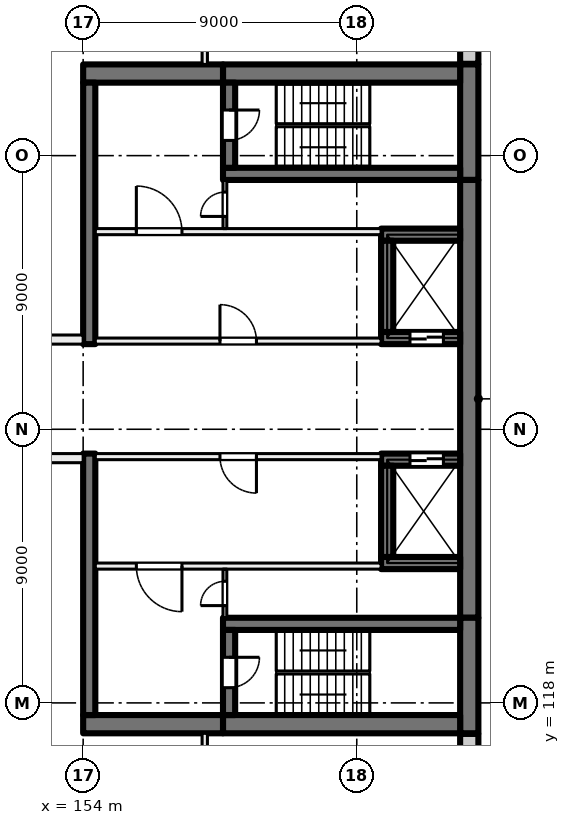
"""IFC4 building model, lengths in metres.
Left out: names, types, materials, properties, quantities, classifications, styles, units other than length and angle.
Written with IfcOpenShell. Run it as: python <this file> out.ifc"""

import sys

from ifc_helpers import new_model, si_unit, direction, frame, frame_2d, origin, place, context, subcontext, project, spatial, rectangle, extrude, element, fill, save


model = new_model("IFC4")
c1 = context("Model", 3, precision=1e-05, world=origin(), true_north=direction((0.0, 1.0)))
c2 = subcontext(c1, "Body", "Model", "MODEL_VIEW")
j1 = project(units=[si_unit("LENGTHUNIT", "METRE"), si_unit("PLANEANGLEUNIT", "RADIAN")], contexts=[c1])
p1 = place(None, origin())
s1 = spatial("IfcSite", under=j1, at=p1, CompositionType="ELEMENT")
p2 = place(p1, origin())
s2 = spatial("IfcBuilding", under=s1, at=p2, CompositionType="ELEMENT")
p3 = place(p2, frame((0.0, 0.0, 47.5)))
s3 = spatial("IfcBuildingStorey", under=s2, at=p3, CompositionType="ELEMENT", Elevation=47.5)
p4 = place(p3, frame((166.7, 139.0, 0.0), z_axis=(0.0, 0.0, 1.0), x_axis=(0.0, -1.0, 0.0)))
e1 = element("IfcWall", 1, at=p4, inside=s3, PredefinedType="SHEAR", context=c2, shape_type="SweptSolid", body=[
    extrude(rectangle(XDim=3.8, YDim=0.6, at=frame_2d((1.9, 0.0))), origin(), (0.0, 0.0, 1.0), 4.0),
])
p5 = place(p3, frame((166.7, 135.2, 0.0), z_axis=(0.0, 0.0, 1.0), x_axis=(0.0, -1.0, 0.0)))
e2 = element("IfcWall", 2, at=p5, inside=s3, PredefinedType="SHEAR", context=c2, shape_type="SweptSolid", body=[
    extrude(rectangle(XDim=14.4, YDim=0.6, at=frame_2d((7.2, 0.0))), origin(), (0.0, 0.0, 1.0), 4.0),
])
p6 = place(p3, frame((166.7, 120.8, 0.0), z_axis=(0.0, 0.0, 1.0), x_axis=(0.0, -1.0, 0.0)))
e3 = element("IfcWall", 3, at=p6, inside=s3, PredefinedType="SHEAR", context=c2, shape_type="SweptSolid", body=[
    extrude(rectangle(XDim=3.8, YDim=0.6, at=frame_2d((1.9, 0.0))), origin(), (0.0, 0.0, 1.0), 4.0),
])
for number, where, z_axis, x_axis in (
    (4, (166.4, 138.7, 0.0), (0.0, 0.0, 1.0), (-1.0, 0.0, 0.0)),
    (5, (166.4, 117.3, 0.0), (0.0, 0.0, 1.0), (-1.0, 0.0, 0.0)),
):
    element("IfcWall", number, at=place(p3, frame(where, z_axis=z_axis, x_axis=x_axis)), inside=s3, PredefinedType="SHEAR", context=c2, shape_type="SweptSolid", body=[
        extrude(rectangle(XDim=7.8, YDim=0.6, at=frame_2d((3.9, 0.0))), origin(), (0.0, 0.0, 1.0), 4.0),
    ])
for number, where, z_axis, x_axis in (
    (6, (158.6, 138.7, 0.0), (0.0, 0.0, 1.0), (-1.0, 0.0, 0.0)),
    (7, (158.6, 117.3, 0.0), (0.0, 0.0, 1.0), (-1.0, 0.0, 0.0)),
):
    element("IfcWall", number, at=place(p3, frame(where, z_axis=z_axis, x_axis=x_axis)), inside=s3, PredefinedType="SHEAR", context=c2, shape_type="SweptSolid", body=[
        extrude(rectangle(XDim=4.6, YDim=0.6, at=frame_2d((2.3, 0.0))), origin(), (0.0, 0.0, 1.0), 4.0),
    ])
p7 = place(p3, frame((166.4, 135.4, 0.0), z_axis=(0.0, 0.0, 1.0), x_axis=(-1.0, 0.0, 0.0)))
e8 = element("IfcWall", 8, at=p7, inside=s3, PredefinedType="SHEAR", context=c2, shape_type="SweptSolid", body=[
    extrude(rectangle(XDim=7.8, YDim=0.4, at=frame_2d((3.9, 0.0))), origin(), (0.0, 0.0, 1.0), 4.0),
])
p8 = place(p3, frame((158.8, 138.4, 0.0), z_axis=(0.0, 0.0, 1.0), x_axis=(0.0, -1.0, 0.0)))
e9 = element("IfcWall", 9, at=p8, inside=s3, PredefinedType="SHEAR", context=c2, shape_type="SweptSolid", body=[
    extrude(rectangle(XDim=2.8, YDim=0.4, at=frame_2d((1.4, 0.0))), origin(), (0.0, 0.0, 1.0), 4.0),
])
p9 = place(p8, frame((0.9, 0.0, 0.0)))
e10 = element("IfcOpeningElement", 10, at=p9, cuts=e9, PredefinedType="OPENING", context=c2, shape_type="SweptSolid", body=[
    extrude(rectangle(XDim=1.0, YDim=2.1, at=frame_2d((0.5, 1.05))), frame((0.0, 0.21, 0.0), z_axis=(0.0, -1.0, 0.0), x_axis=(1.0, 0.0, 0.0)), (0.0, 0.0, 1.0), 0.42),
])
p10 = place(p3, frame((166.4, 120.6, 0.0), z_axis=(0.0, 0.0, 1.0), x_axis=(-1.0, 0.0, 0.0)))
e11 = element("IfcWall", 11, at=p10, inside=s3, PredefinedType="SHEAR", context=c2, shape_type="SweptSolid", body=[
    extrude(rectangle(XDim=7.8, YDim=0.4, at=frame_2d((3.9, 0.0))), origin(), (0.0, 0.0, 1.0), 4.0),
])
p11 = place(p3, frame((158.8, 120.4, 0.0), z_axis=(0.0, 0.0, 1.0), x_axis=(0.0, -1.0, 0.0)))
e12 = element("IfcWall", 12, at=p11, inside=s3, PredefinedType="SHEAR", context=c2, shape_type="SweptSolid", body=[
    extrude(rectangle(XDim=2.8, YDim=0.4, at=frame_2d((1.4, 0.0))), origin(), (0.0, 0.0, 1.0), 4.0),
])
p12 = place(p11, frame((0.9, 0.0, 0.0)))
e13 = element("IfcOpeningElement", 13, at=p12, cuts=e12, PredefinedType="OPENING", context=c2, shape_type="SweptSolid", body=[
    extrude(rectangle(XDim=1.0, YDim=2.1, at=frame_2d((0.5, 1.05))), frame((0.0, 0.21, 0.0), z_axis=(0.0, -1.0, 0.0), x_axis=(1.0, 0.0, 0.0)), (0.0, 0.0, 1.0), 0.42),
])
p13 = place(p3, frame((166.4, 130.0, 0.0), z_axis=(0.0, 0.0, 1.0), x_axis=(-1.0, 0.0, 0.0)))
e14 = element("IfcWall", 14, at=p13, inside=s3, PredefinedType="SHEAR", context=c2, shape_type="SweptSolid", body=[
    extrude(rectangle(XDim=2.6, YDim=0.4, at=frame_2d((1.3, 0.0))), origin(), (0.0, 0.0, 1.0), 4.0),
])
p14 = place(p13, frame((0.55, 0.0, 0.0)))
e15 = element("IfcOpeningElement", 15, at=p14, cuts=e14, PredefinedType="OPENING", context=c2, shape_type="SweptSolid", body=[
    extrude(rectangle(XDim=1.1, YDim=2.1, at=frame_2d((0.55, 1.05))), frame((0.0, 0.21, 0.0), z_axis=(0.0, -1.0, 0.0), x_axis=(1.0, 0.0, 0.0)), (0.0, 0.0, 1.0), 0.42),
])
p15 = place(p3, frame((166.4, 133.4, 0.0), z_axis=(0.0, 0.0, 1.0), x_axis=(-1.0, 0.0, 0.0)))
e16 = element("IfcWall", 16, at=p15, inside=s3, PredefinedType="SHEAR", context=c2, shape_type="SweptSolid", body=[
    extrude(rectangle(XDim=2.6, YDim=0.4, at=frame_2d((1.3, 0.0))), origin(), (0.0, 0.0, 1.0), 4.0),
])
p16 = place(p3, frame((164.0, 133.2, 0.0), z_axis=(0.0, 0.0, 1.0), x_axis=(0.0, -1.0, 0.0)))
e17 = element("IfcWall", 17, at=p16, inside=s3, PredefinedType="SHEAR", context=c2, shape_type="SweptSolid", body=[
    extrude(rectangle(XDim=3.0, YDim=0.4, at=frame_2d((1.5, 0.0))), origin(), (0.0, 0.0, 1.0), 4.0),
])
p17 = place(p3, frame((166.4, 126.0, 0.0), z_axis=(0.0, 0.0, 1.0), x_axis=(-1.0, 0.0, 0.0)))
e18 = element("IfcWall", 18, at=p17, inside=s3, PredefinedType="SHEAR", context=c2, shape_type="SweptSolid", body=[
    extrude(rectangle(XDim=2.6, YDim=0.4, at=frame_2d((1.3, 0.0))), origin(), (0.0, 0.0, 1.0), 4.0),
])
p18 = place(p17, frame((0.55, 0.0, 0.0)))
e19 = element("IfcOpeningElement", 19, at=p18, cuts=e18, PredefinedType="OPENING", context=c2, shape_type="SweptSolid", body=[
    extrude(rectangle(XDim=1.1, YDim=2.1, at=frame_2d((0.55, 1.05))), frame((0.0, 0.21, 0.0), z_axis=(0.0, -1.0, 0.0), x_axis=(1.0, 0.0, 0.0)), (0.0, 0.0, 1.0), 0.42),
])
p19 = place(p3, frame((166.4, 122.6, 0.0), z_axis=(0.0, 0.0, 1.0), x_axis=(-1.0, 0.0, 0.0)))
e20 = element("IfcWall", 20, at=p19, inside=s3, PredefinedType="SHEAR", context=c2, shape_type="SweptSolid", body=[
    extrude(rectangle(XDim=2.6, YDim=0.4, at=frame_2d((1.3, 0.0))), origin(), (0.0, 0.0, 1.0), 4.0),
])
p20 = place(p3, frame((164.0, 125.8, 0.0), z_axis=(0.0, 0.0, 1.0), x_axis=(0.0, -1.0, 0.0)))
e21 = element("IfcWall", 21, at=p20, inside=s3, PredefinedType="SHEAR", context=c2, shape_type="SweptSolid", body=[
    extrude(rectangle(XDim=3.0, YDim=0.4, at=frame_2d((1.5, 0.0))), origin(), (0.0, 0.0, 1.0), 4.0),
])
for number, where, z_axis, x_axis in (
    (22, (154.2, 138.4, 0.0), (0.0, 0.0, 1.0), (0.0, -1.0, 0.0)),
    (23, (154.2, 126.2, 0.0), (0.0, 0.0, 1.0), (0.0, -1.0, 0.0)),
):
    element("IfcWall", number, at=place(p3, frame(where, z_axis=z_axis, x_axis=x_axis)), inside=s3, PredefinedType="SHEAR", context=c2, shape_type="SweptSolid", body=[
        extrude(rectangle(XDim=8.6, YDim=0.4, at=frame_2d((4.3, 0.0))), origin(), (0.0, 0.0, 1.0), 4.0),
    ])
p21 = place(p3, frame((166.7, 116.98, 0.0), z_axis=(0.0, 0.0, 1.0), x_axis=(0.0, -1.0, 0.0)))
e24 = element("IfcWall", 24, at=p21, inside=s3, PredefinedType="SOLIDWALL", context=c2, shape_type="SweptSolid", body=[
    extrude(rectangle(XDim=2.98, YDim=0.6, at=frame_2d((1.49, 0.0))), origin(), (0.0, 0.0, 1.0), 3.625),
])
p22 = place(p3, frame((166.7, 141.93, 0.0), z_axis=(0.0, 0.0, 1.0), x_axis=(0.0, -1.0, 0.0)))
e25 = element("IfcWall", 25, at=p22, inside=s3, PredefinedType="SOLIDWALL", context=c2, shape_type="SweptSolid", body=[
    extrude(rectangle(XDim=2.91, YDim=0.6, at=frame_2d((1.455, 0.0))), origin(), (0.0, 0.0, 1.0), 3.625),
])
p23 = place(p3, frame((163.8, 126.1, 0.0), z_axis=(0.0, 0.0, 1.0), x_axis=(-1.0, 0.0, 0.0)))
e26 = element("IfcWall", 26, at=p23, inside=s3, PredefinedType="PARTITIONING", context=c2, shape_type="SweptSolid", body=[
    extrude(rectangle(XDim=9.4, YDim=0.2, at=frame_2d((4.7, 0.0))), origin(), (0.0, 0.0, 1.0), 3.625),
])
p24 = place(p23, frame((4.1, 0.0, 0.0)))
e27 = element("IfcOpeningElement", 27, at=p24, cuts=e26, PredefinedType="OPENING", context=c2, shape_type="SweptSolid", body=[
    extrude(rectangle(XDim=1.2, YDim=2.1, at=frame_2d((0.6, 1.05))), frame((0.0, 0.11, 0.0), z_axis=(0.0, -1.0, 0.0), x_axis=(1.0, 0.0, 0.0)), (0.0, 0.0, 1.0), 0.22),
])
p25 = place(p3, frame((163.8, 122.5, 0.0), z_axis=(0.0, 0.0, 1.0), x_axis=(-1.0, 0.0, 0.0)))
e28 = element("IfcWall", 28, at=p25, inside=s3, PredefinedType="PARTITIONING", context=c2, shape_type="SweptSolid", body=[
    extrude(rectangle(XDim=9.4, YDim=0.2, at=frame_2d((4.7, 0.0))), origin(), (0.0, 0.0, 1.0), 3.625),
])
p26 = place(p25, frame((6.55, 0.0, 0.0)))
e29 = element("IfcOpeningElement", 29, at=p26, cuts=e28, PredefinedType="OPENING", context=c2, shape_type="SweptSolid", body=[
    extrude(rectangle(XDim=1.5, YDim=2.1, at=frame_2d((0.75, 1.05))), frame((0.0, 0.11, 0.0), z_axis=(0.0, -1.0, 0.0), x_axis=(1.0, 0.0, 0.0)), (0.0, 0.0, 1.0), 0.22),
])
p27 = place(p3, frame((158.663, 120.8, 0.0), z_axis=(0.0, 0.0, 1.0), x_axis=(0.0, 1.0, 0.0)))
e30 = element("IfcWall", 30, at=p27, inside=s3, PredefinedType="PARTITIONING", context=c2, shape_type="SweptSolid", body=[
    extrude(rectangle(XDim=1.6, YDim=0.125, at=frame_2d((0.8, 0.0))), origin(), (0.0, 0.0, 1.0), 3.625),
])
p28 = place(p27, frame((0.4, 0.0, 0.0)))
e31 = element("IfcOpeningElement", 31, at=p28, cuts=e30, PredefinedType="OPENING", context=c2, shape_type="SweptSolid", body=[
    extrude(rectangle(XDim=0.8, YDim=2.1, at=frame_2d((0.4, 1.05))), frame((0.0, 0.073, 0.0), z_axis=(0.0, -1.0, 0.0), x_axis=(1.0, 0.0, 0.0)), (0.0, 0.0, 1.0), 0.145),
])
p29 = place(p3, frame((154.4, 129.9, 0.0), z_axis=(0.0, 0.0, 1.0), x_axis=(1.0, 0.0, 0.0)))
e32 = element("IfcWall", 32, at=p29, inside=s3, PredefinedType="PARTITIONING", context=c2, shape_type="SweptSolid", body=[
    extrude(rectangle(XDim=9.4, YDim=0.2, at=frame_2d((4.7, 0.0))), origin(), (0.0, 0.0, 1.0), 3.625),
])
p30 = place(p29, frame((4.1, 0.0, 0.0)))
e33 = element("IfcOpeningElement", 33, at=p30, cuts=e32, PredefinedType="OPENING", context=c2, shape_type="SweptSolid", body=[
    extrude(rectangle(XDim=1.2, YDim=2.1, at=frame_2d((0.6, 1.05))), frame((0.0, 0.11, 0.0), z_axis=(0.0, -1.0, 0.0), x_axis=(1.0, 0.0, 0.0)), (0.0, 0.0, 1.0), 0.22),
])
p31 = place(p3, frame((154.4, 133.5, 0.0), z_axis=(0.0, 0.0, 1.0), x_axis=(1.0, 0.0, 0.0)))
e34 = element("IfcWall", 34, at=p31, inside=s3, PredefinedType="PARTITIONING", context=c2, shape_type="SweptSolid", body=[
    extrude(rectangle(XDim=9.4, YDim=0.2, at=frame_2d((4.7, 0.0))), origin(), (0.0, 0.0, 1.0), 3.625),
])
p32 = place(p31, frame((1.35, 0.0, 0.0)))
e35 = element("IfcOpeningElement", 35, at=p32, cuts=e34, PredefinedType="OPENING", context=c2, shape_type="SweptSolid", body=[
    extrude(rectangle(XDim=1.5, YDim=2.1, at=frame_2d((0.75, 1.05))), frame((0.0, 0.11, 0.0), z_axis=(0.0, -1.0, 0.0), x_axis=(1.0, 0.0, 0.0)), (0.0, 0.0, 1.0), 0.22),
])
p33 = place(p3, frame((158.663, 133.6, 0.0), z_axis=(0.0, 0.0, 1.0), x_axis=(0.0, 1.0, 0.0)))
e36 = element("IfcWall", 36, at=p33, inside=s3, PredefinedType="PARTITIONING", context=c2, shape_type="SweptSolid", body=[
    extrude(rectangle(XDim=1.6, YDim=0.125, at=frame_2d((0.8, 0.0))), origin(), (0.0, 0.0, 1.0), 3.625),
])
p34 = place(p33, frame((0.4, 0.0, 0.0)))
e37 = element("IfcOpeningElement", 37, at=p34, cuts=e36, PredefinedType="OPENING", context=c2, shape_type="SweptSolid", body=[
    extrude(rectangle(XDim=0.8, YDim=2.1, at=frame_2d((0.4, 1.05))), frame((0.0, 0.073, 0.0), z_axis=(0.0, -1.0, 0.0), x_axis=(1.0, 0.0, 0.0)), (0.0, 0.0, 1.0), 0.145),
])
p35 = place(p3, frame((140.0, 129.95, 0.0), z_axis=(0.0, 0.0, 1.0), x_axis=(1.0, 0.0, 0.0)))
e38 = element("IfcWall", 38, at=p35, inside=s3, PredefinedType="PARTITIONING", context=c2, shape_type="SweptSolid", body=[
    extrude(rectangle(XDim=14.0, YDim=0.3, at=frame_2d((7.0, 0.0))), origin(), (0.0, 0.0, 1.0), 3.625),
])
p36 = place(p35, frame((2.75, 0.0, 0.0)))
e39 = element("IfcOpeningElement", 39, at=p36, cuts=e38, PredefinedType="OPENING", context=c2, shape_type="SweptSolid", body=[
    extrude(rectangle(XDim=1.0, YDim=2.1, at=frame_2d((0.5, 1.05))), frame((0.0, 0.16, 0.0), z_axis=(0.0, -1.0, 0.0), x_axis=(1.0, 0.0, 0.0)), (0.0, 0.0, 1.0), 0.32),
])
p37 = place(p35, frame((10.6, 0.0, 0.0)))
e40 = element("IfcOpeningElement", 40, at=p37, cuts=e38, PredefinedType="OPENING", context=c2, shape_type="SweptSolid", body=[
    extrude(rectangle(XDim=1.8, YDim=2.1, at=frame_2d((0.9, 1.05))), frame((0.0, 0.16, 0.0), z_axis=(0.0, -1.0, 0.0), x_axis=(1.0, 0.0, 0.0)), (0.0, 0.0, 1.0), 0.32),
])
p38 = place(p3, frame((154.0, 126.05, 0.0), z_axis=(0.0, 0.0, 1.0), x_axis=(-1.0, 0.0, 0.0)))
e41 = element("IfcWall", 41, at=p38, inside=s3, PredefinedType="PARTITIONING", context=c2, shape_type="SweptSolid", body=[
    extrude(rectangle(XDim=14.0, YDim=0.3, at=frame_2d((7.0, 0.0))), origin(), (0.0, 0.0, 1.0), 3.625),
])
p39 = place(p38, frame((6.1, 0.0, 0.0)))
e42 = element("IfcOpeningElement", 42, at=p39, cuts=e41, PredefinedType="OPENING", context=c2, shape_type="SweptSolid", body=[
    extrude(rectangle(XDim=1.8, YDim=2.1, at=frame_2d((0.9, 1.05))), frame((0.0, 0.16, 0.0), z_axis=(0.0, -1.0, 0.0), x_axis=(1.0, 0.0, 0.0)), (0.0, 0.0, 1.0), 0.32),
])
p40 = place(p3, frame((158.0, 110.6, 0.0), z_axis=(0.0, 0.0, 1.0), x_axis=(0.0, 1.0, 0.0)))
e43 = element("IfcWall", 43, at=p40, inside=s3, PredefinedType="PARTITIONING", context=c2, shape_type="SweptSolid", body=[
    extrude(rectangle(XDim=6.4, YDim=0.175, at=frame_2d((3.2, 0.0))), origin(), (0.0, 0.0, 1.0), 3.625),
])
p41 = place(p40, frame((2.6, 0.0, 0.0)))
e44 = element("IfcOpeningElement", 44, at=p41, cuts=e43, PredefinedType="OPENING", context=c2, shape_type="SweptSolid", body=[
    extrude(rectangle(XDim=1.2, YDim=2.1, at=frame_2d((0.6, 1.05))), frame((0.0, 0.097, 0.0), z_axis=(0.0, -1.0, 0.0), x_axis=(1.0, 0.0, 0.0)), (0.0, 0.0, 1.0), 0.195),
])
p42 = place(p3, frame((158.0, 139.0, 0.0), z_axis=(0.0, 0.0, 1.0), x_axis=(0.0, 1.0, 0.0)))
e45 = element("IfcWall", 45, at=p42, inside=s3, PredefinedType="PARTITIONING", context=c2, shape_type="SweptSolid", body=[
    extrude(rectangle(XDim=6.4, YDim=0.175, at=frame_2d((3.2, 0.0))), origin(), (0.0, 0.0, 1.0), 3.625),
])
p43 = place(p42, frame((2.6, 0.0, 0.0)))
e46 = element("IfcOpeningElement", 46, at=p43, cuts=e45, PredefinedType="OPENING", context=c2, shape_type="SweptSolid", body=[
    extrude(rectangle(XDim=1.2, YDim=2.1, at=frame_2d((0.6, 1.05))), frame((0.0, 0.097, 0.0), z_axis=(0.0, -1.0, 0.0), x_axis=(1.0, 0.0, 0.0)), (0.0, 0.0, 1.0), 0.195),
])
p44 = place(p18, origin())
e47 = element("IfcDoor", 47, at=p44, inside=s3, OperationType="DOUBLE_DOOR_SLIDING", PredefinedType="DOOR", context=c2, shape_type="SweptSolid", body=[
    extrude(rectangle(XDim=1.1, YDim=2.1, at=frame_2d((0.55, 1.05))), frame((0.0, 0.025, 0.0), z_axis=(0.0, -1.0, 0.0), x_axis=(1.0, 0.0, 0.0)), (0.0, 0.0, 1.0), 0.05),
])
fill(e19, e47)
p45 = place(p14, origin())
e48 = element("IfcDoor", 48, at=p45, inside=s3, OperationType="DOUBLE_DOOR_SLIDING", PredefinedType="DOOR", context=c2, shape_type="SweptSolid", body=[
    extrude(rectangle(XDim=1.1, YDim=2.1, at=frame_2d((0.55, 1.05))), frame((0.0, 0.025, 0.0), z_axis=(0.0, -1.0, 0.0), x_axis=(1.0, 0.0, 0.0)), (0.0, 0.0, 1.0), 0.05),
])
fill(e15, e48)
p46 = place(p24, origin())
e49 = element("IfcDoor", 49, at=p46, inside=s3, OperationType="DOUBLE_DOOR_SINGLE_SWING", PredefinedType="DOOR", context=c2, shape_type="SweptSolid", body=[
    extrude(rectangle(XDim=1.2, YDim=2.1, at=frame_2d((0.6, 1.05))), frame((0.0, 0.025, 0.0), z_axis=(0.0, -1.0, 0.0), x_axis=(1.0, 0.0, 0.0)), (0.0, 0.0, 1.0), 0.05),
])
fill(e27, e49)
p47 = place(p26, origin())
e50 = element("IfcDoor", 50, at=p47, inside=s3, OperationType="DOUBLE_DOOR_SINGLE_SWING", PredefinedType="DOOR", context=c2, shape_type="SweptSolid", body=[
    extrude(rectangle(XDim=1.5, YDim=2.1, at=frame_2d((0.75, 1.05))), frame((0.0, 0.025, 0.0), z_axis=(0.0, -1.0, 0.0), x_axis=(1.0, 0.0, 0.0)), (0.0, 0.0, 1.0), 0.05),
])
fill(e29, e50)
p48 = place(p12, origin())
e51 = element("IfcDoor", 51, at=p48, inside=s3, OperationType="SINGLE_SWING_LEFT", PredefinedType="DOOR", context=c2, shape_type="SweptSolid", body=[
    extrude(rectangle(XDim=1.0, YDim=2.1, at=frame_2d((0.5, 1.05))), frame((0.0, 0.025, 0.0), z_axis=(0.0, -1.0, 0.0), x_axis=(1.0, 0.0, 0.0)), (0.0, 0.0, 1.0), 0.05),
])
fill(e13, e51)
p49 = place(p28, origin())
e52 = element("IfcDoor", 52, at=p49, inside=s3, OperationType="SINGLE_SWING_RIGHT", PredefinedType="DOOR", context=c2, shape_type="SweptSolid", body=[
    extrude(rectangle(XDim=0.8, YDim=2.1, at=frame_2d((0.4, 1.05))), frame((0.0, 0.025, 0.0), z_axis=(0.0, -1.0, 0.0), x_axis=(1.0, 0.0, 0.0)), (0.0, 0.0, 1.0), 0.05),
])
fill(e31, e52)
p50 = place(p30, origin())
e53 = element("IfcDoor", 53, at=p50, inside=s3, OperationType="DOUBLE_DOOR_SINGLE_SWING", PredefinedType="DOOR", context=c2, shape_type="SweptSolid", body=[
    extrude(rectangle(XDim=1.2, YDim=2.1, at=frame_2d((0.6, 1.05))), frame((0.0, 0.025, 0.0), z_axis=(0.0, -1.0, 0.0), x_axis=(1.0, 0.0, 0.0)), (0.0, 0.0, 1.0), 0.05),
])
fill(e33, e53)
p51 = place(p32, origin())
e54 = element("IfcDoor", 54, at=p51, inside=s3, OperationType="DOUBLE_DOOR_SINGLE_SWING", PredefinedType="DOOR", context=c2, shape_type="SweptSolid", body=[
    extrude(rectangle(XDim=1.5, YDim=2.1, at=frame_2d((0.75, 1.05))), frame((0.0, 0.025, 0.0), z_axis=(0.0, -1.0, 0.0), x_axis=(1.0, 0.0, 0.0)), (0.0, 0.0, 1.0), 0.05),
])
fill(e35, e54)
p52 = place(p9, origin())
e55 = element("IfcDoor", 55, at=p52, inside=s3, OperationType="SINGLE_SWING_RIGHT", PredefinedType="DOOR", context=c2, shape_type="SweptSolid", body=[
    extrude(rectangle(XDim=1.0, YDim=2.1, at=frame_2d((0.5, 1.05))), frame((0.0, 0.025, 0.0), z_axis=(0.0, -1.0, 0.0), x_axis=(1.0, 0.0, 0.0)), (0.0, 0.0, 1.0), 0.05),
])
fill(e10, e55)
p53 = place(p34, origin())
e56 = element("IfcDoor", 56, at=p53, inside=s3, OperationType="SINGLE_SWING_LEFT", PredefinedType="DOOR", context=c2, shape_type="SweptSolid", body=[
    extrude(rectangle(XDim=0.8, YDim=2.1, at=frame_2d((0.4, 1.05))), frame((0.0, 0.025, 0.0), z_axis=(0.0, -1.0, 0.0), x_axis=(1.0, 0.0, 0.0)), (0.0, 0.0, 1.0), 0.05),
])
fill(e37, e56)
save(model, sys.argv[1])
